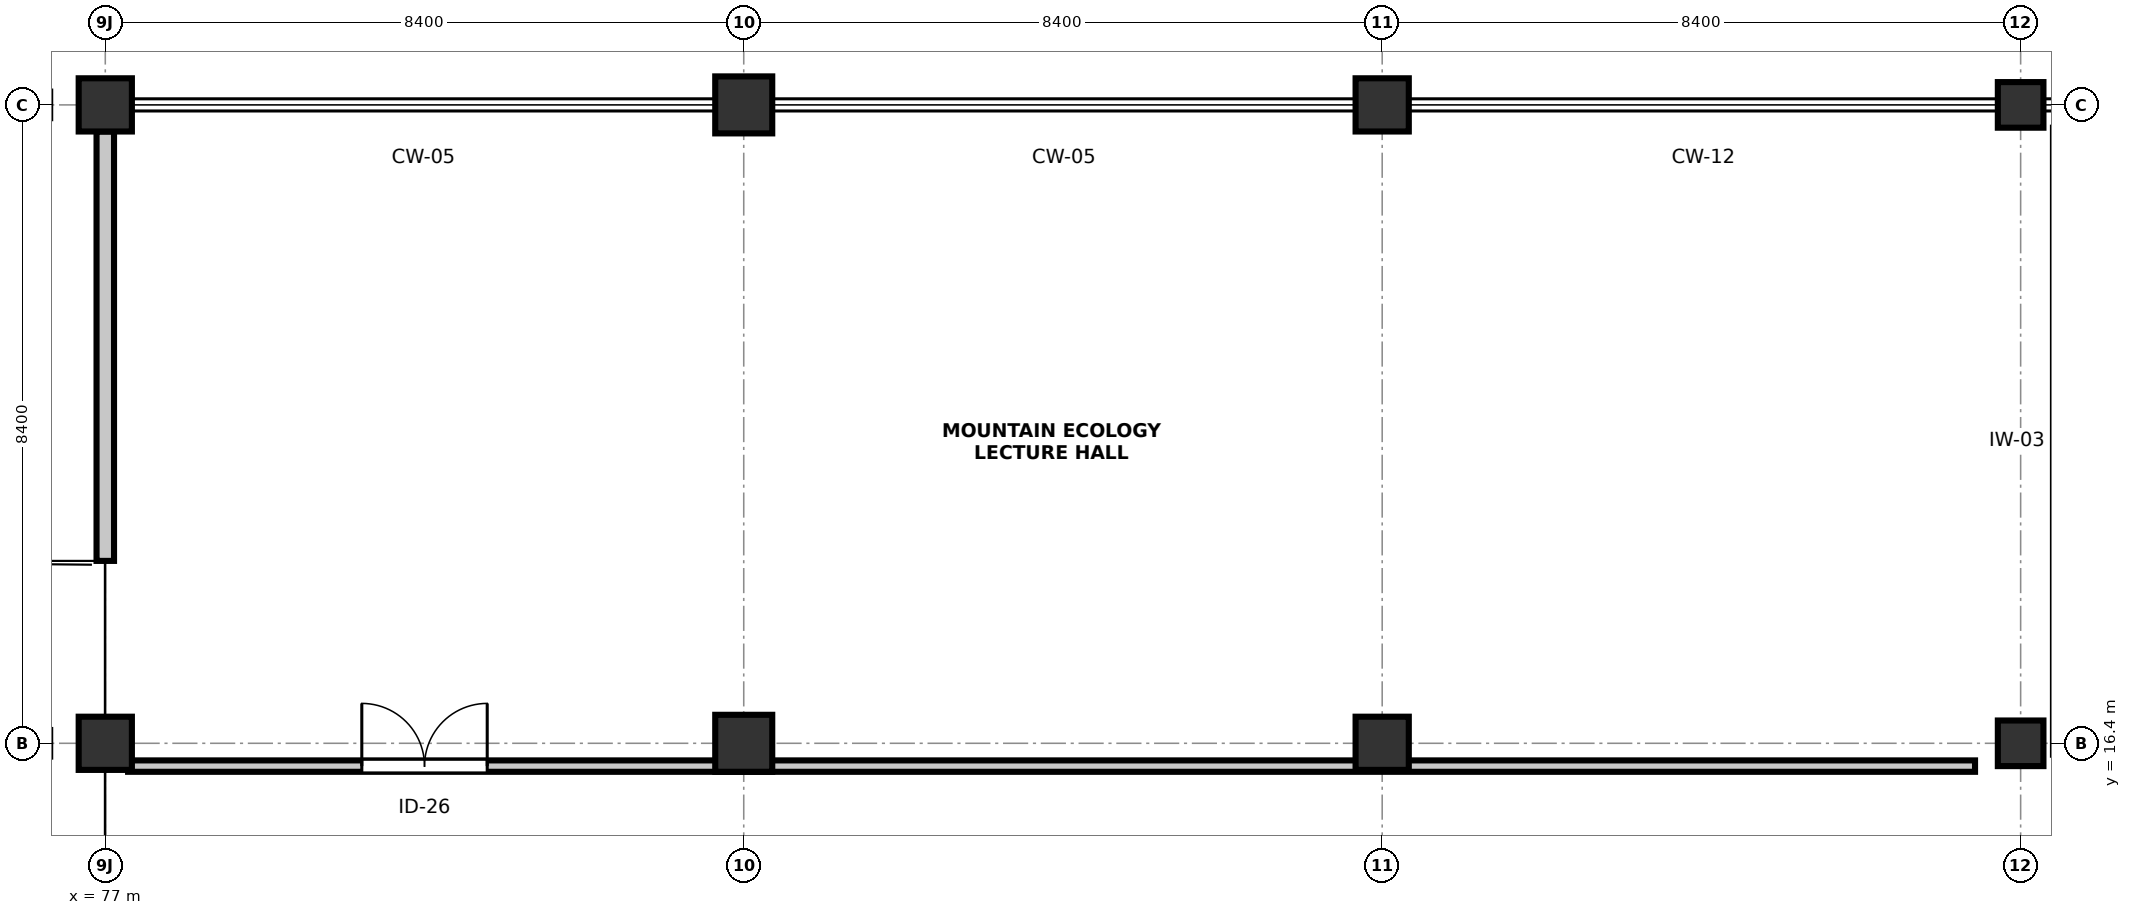
"""IFC4 building model, lengths in metres.
Left out: names, types, materials, properties, quantities, classifications, styles, units other than length and angle.
Written with IfcOpenShell. Run it as: python <this file> out.ifc"""

import sys

from ifc_helpers import new_model, si_unit, direction, frame, frame_2d, origin, origin_2d, place, context, subcontext, project, spatial, rectangle, extrude, element, fill, save


model = new_model("IFC4")
c1 = context("Model", 3, precision=1e-05, world=origin(), true_north=direction((0.0, 1.0)))
c2 = subcontext(c1, "Body", "Model", "MODEL_VIEW")
j1 = project(units=[si_unit("LENGTHUNIT", "METRE"), si_unit("PLANEANGLEUNIT", "RADIAN")], contexts=[c1])
p1 = place(None, origin())
s1 = spatial("IfcSite", under=j1, at=p1, CompositionType="ELEMENT")
p2 = place(p1, origin())
s2 = spatial("IfcBuilding", under=s1, at=p2, CompositionType="ELEMENT")
p3 = place(p2, frame((0.0, 0.0, 9.6)))
s3 = spatial("IfcBuildingStorey", under=s2, at=p3, CompositionType="ELEMENT", Elevation=9.6)
for number, where, z_axis, x_axis in (
    (1, (77.0, 16.4, 0.0), (0.0, 0.0, 1.0), (1.0, 0.0, 0.0)),
    (2, (77.0, 24.8, 0.0), (0.0, 0.0, 1.0), (1.0, 0.0, 0.0)),
):
    element("IfcColumn", number, at=place(p3, frame(where, z_axis=z_axis, x_axis=x_axis)), inside=s3, PredefinedType="COLUMN", context=c2, shape_type="SweptSolid", body=[
        extrude(rectangle(XDim=0.7, YDim=0.7, at=origin_2d()), origin(), (0.0, 0.0, 1.0), 4.8),
    ])
for number, where, z_axis, x_axis in (
    (3, (85.4, 16.4, 0.0), (0.0, 0.0, 1.0), (1.0, 0.0, 0.0)),
    (4, (85.4, 24.8, 0.0), (0.0, 0.0, 1.0), (1.0, 0.0, 0.0)),
):
    element("IfcColumn", number, at=place(p3, frame(where, z_axis=z_axis, x_axis=x_axis)), inside=s3, PredefinedType="COLUMN", context=c2, shape_type="SweptSolid", body=[
        extrude(rectangle(XDim=0.75, YDim=0.75, at=origin_2d()), origin(), (0.0, 0.0, 1.0), 4.8),
    ])
for number, where, z_axis, x_axis in (
    (5, (93.8, 16.4, 0.0), (0.0, 0.0, 1.0), (1.0, 0.0, 0.0)),
    (6, (93.8, 24.8, 0.0), (0.0, 0.0, 1.0), (1.0, 0.0, 0.0)),
):
    element("IfcColumn", number, at=place(p3, frame(where, z_axis=z_axis, x_axis=x_axis)), inside=s3, PredefinedType="COLUMN", context=c2, shape_type="SweptSolid", body=[
        extrude(rectangle(XDim=0.7, YDim=0.7, at=origin_2d()), origin(), (0.0, 0.0, 1.0), 4.8),
    ])
for number, where, z_axis, x_axis in (
    (7, (102.2, 16.4, 0.0), (0.0, 0.0, 1.0), (1.0, 0.0, 0.0)),
    (8, (102.2, 24.8, 0.0), (0.0, 0.0, 1.0), (1.0, 0.0, 0.0)),
):
    element("IfcColumn", number, at=place(p3, frame(where, z_axis=z_axis, x_axis=x_axis)), inside=s3, PredefinedType="COLUMN", context=c2, shape_type="SweptSolid", body=[
        extrude(rectangle(XDim=0.6, YDim=0.6, at=origin_2d()), origin(), (0.0, 0.0, 1.0), 4.8),
    ])
p4 = place(p3, frame((77.0, 18.8, 0.0), z_axis=(0.0, 0.0, 1.0), x_axis=(0.0, 1.0, 0.0)))
e9 = element("IfcWall", 9, at=p4, inside=s3, PredefinedType="STANDARD", context=c2, shape_type="SweptSolid", body=[
    extrude(rectangle(XDim=5.65, YDim=0.23, at=frame_2d((2.825, 0.0))), origin(), (0.0, 0.0, 1.0), 3.715),
])
p5 = place(p3, frame((77.3, 16.1, 0.0), z_axis=(0.0, 0.0, 1.0), x_axis=(1.0, 0.0, 0.0)))
e10 = element("IfcWall", 10, at=p5, inside=s3, PredefinedType="PARTITIONING", context=c2, shape_type="SweptSolid", body=[
    extrude(rectangle(XDim=24.3, YDim=0.15, at=frame_2d((12.15, 0.0))), origin(), (0.0, 0.0, 1.0), 3.615),
])
p6 = place(p5, frame((3.075, 0.0, 0.0)))
e11 = element("IfcOpeningElement", 11, at=p6, cuts=e10, PredefinedType="OPENING", context=c2, shape_type="SweptSolid", body=[
    extrude(rectangle(XDim=1.65, YDim=2.3, at=frame_2d((0.825, 1.15))), frame((0.0, 0.085, 0.0), z_axis=(0.0, -1.0, 0.0), x_axis=(1.0, 0.0, 0.0)), (0.0, 0.0, 1.0), 0.17),
])
p7 = place(p6, origin())
e12 = element("IfcDoor", 12, at=p7, inside=s3, OperationType="DOUBLE_DOOR_SINGLE_SWING", PredefinedType="DOOR", context=c2, shape_type="SweptSolid", body=[
    extrude(rectangle(XDim=1.65, YDim=2.3, at=frame_2d((0.825, 1.15))), frame((0.0, 0.025, 0.0), z_axis=(0.0, -1.0, 0.0), x_axis=(1.0, 0.0, 0.0)), (0.0, 0.0, 1.0), 0.05),
])
fill(e11, e12)
save(model, sys.argv[1])
